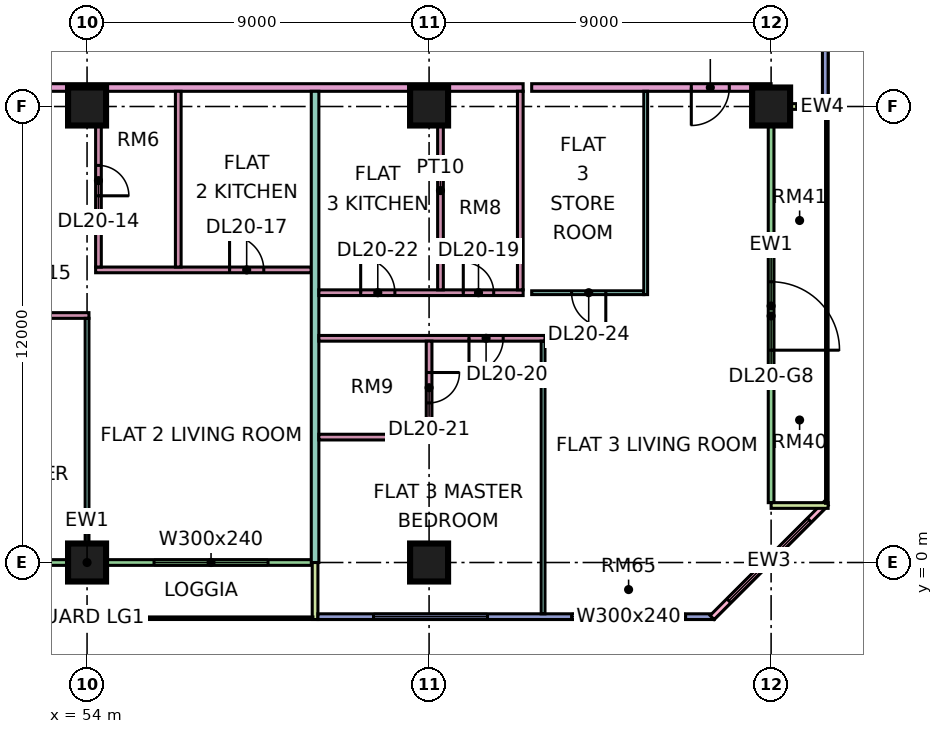
"""IFC4 building model, lengths in metres.
Left out: names, types, materials, properties, quantities, classifications, styles, units other than length and angle.
Written with IfcOpenShell. Run it as: python <this file> out.ifc"""

import sys

from ifc_helpers import new_model, si_unit, direction, frame, frame_2d, origin, origin_2d, place, context, subcontext, project, spatial, rectangle, extrude, element, fill, save


model = new_model("IFC4")
c1 = context("Model", 3, precision=1e-05, world=origin(), true_north=direction((0.0, 1.0)))
c2 = subcontext(c1, "Body", "Model", "MODEL_VIEW")
j1 = project(units=[si_unit("LENGTHUNIT", "METRE"), si_unit("PLANEANGLEUNIT", "RADIAN")], contexts=[c1])
p1 = place(None, origin())
s1 = spatial("IfcSite", under=j1, at=p1, CompositionType="ELEMENT")
p2 = place(p1, origin())
s2 = spatial("IfcBuilding", under=s1, at=p2, CompositionType="ELEMENT")
p3 = place(p2, frame((0.0, 0.0, 91.9)))
s3 = spatial("IfcBuildingStorey", under=s2, at=p3, CompositionType="ELEMENT", Elevation=91.9)
for number, where, z_axis, x_axis in (
    (1, (54.0, 0.0, 0.0), (0.0, 0.0, 1.0), (1.0, 0.0, 0.0)),
    (2, (54.0, 12.0, 0.0), (0.0, 0.0, 1.0), (1.0, 0.0, 0.0)),
    (3, (63.0, 0.0, 0.0), (0.0, 0.0, 1.0), (1.0, 0.0, 0.0)),
    (4, (63.0, 12.0, 0.0), (0.0, 0.0, 1.0), (1.0, 0.0, 0.0)),
    (5, (72.0, 12.0, 0.0), (0.0, 0.0, 1.0), (1.0, 0.0, 0.0)),
):
    element("IfcColumn", number, at=place(p3, frame(where, z_axis=z_axis, x_axis=x_axis)), inside=s3, PredefinedType="COLUMN", context=c2, shape_type="SweptSolid", body=[
        extrude(rectangle(XDim=1.0, YDim=1.0, at=origin_2d()), origin(), (0.0, 0.0, 1.0), 3.75),
    ])
p4 = place(p3, frame((48.075, 0.0, 0.0), z_axis=(0.0, 0.0, 1.0), x_axis=(1.0, 0.0, 0.0)))
e6 = element("IfcWall", 6, at=p4, inside=s3, PredefinedType="SOLIDWALL", context=c2, shape_type="SweptSolid", body=[
    extrude(rectangle(XDim=11.85, YDim=0.15, at=frame_2d((5.925, 0.0))), origin(), (0.0, 0.0, 1.0), 3.35),
])
p5 = place(p4, frame((1.762, 0.0, 0.0)))
e7 = element("IfcOpeningElement", 7, at=p5, cuts=e6, PredefinedType="OPENING", context=c2, shape_type="SweptSolid", body=[
    extrude(rectangle(XDim=1.8, YDim=2.4, at=frame_2d((0.9, 1.2))), frame((0.0, 0.085, 0.0), z_axis=(0.0, -1.0, 0.0), x_axis=(1.0, 0.0, 0.0)), (0.0, 0.0, 1.0), 0.17),
])
p6 = place(p4, frame((7.688, 0.0, 0.45)))
e8 = element("IfcOpeningElement", 8, at=p6, cuts=e6, PredefinedType="OPENING", context=c2, shape_type="SweptSolid", body=[
    extrude(rectangle(XDim=3.0, YDim=2.4, at=frame_2d((1.5, 1.2))), frame((0.0, 0.085, 0.0), z_axis=(0.0, -1.0, 0.0), x_axis=(1.0, 0.0, 0.0)), (0.0, 0.0, 1.0), 0.17),
])
p7 = place(p3, frame((60.0, -1.5, 0.0), z_axis=(0.0, 0.0, 1.0), x_axis=(0.0, 1.0, 0.0)))
e9 = element("IfcWall", 9, at=p7, inside=s3, PredefinedType="SOLIDWALL", context=c2, shape_type="SweptSolid", body=[
    extrude(rectangle(XDim=1.5, YDim=0.15, at=frame_2d((0.75, 0.0))), origin(), (0.0, 0.0, 1.0), 3.35),
])
p8 = place(p3, frame((60.075, -1.425, 0.0), z_axis=(0.0, 0.0, 1.0), x_axis=(1.0, 0.0, 0.0)))
e10 = element("IfcWall", 10, at=p8, inside=s3, PredefinedType="SOLIDWALL", context=c2, shape_type="SweptSolid", body=[
    extrude(rectangle(XDim=10.425, YDim=0.15, at=frame_2d((5.212, 0.0))), origin(), (0.0, 0.0, 1.0), 3.35),
])
p9 = place(p8, frame((1.462, 0.0, 0.45)))
e11 = element("IfcOpeningElement", 11, at=p9, cuts=e10, PredefinedType="OPENING", context=c2, shape_type="SweptSolid", body=[
    extrude(rectangle(XDim=3.0, YDim=2.4, at=frame_2d((1.5, 1.2))), frame((0.0, 0.085, 0.0), z_axis=(0.0, -1.0, 0.0), x_axis=(1.0, 0.0, 0.0)), (0.0, 0.0, 1.0), 0.17),
])
p10 = place(p8, frame((6.675, 0.0, 0.45)))
e12 = element("IfcOpeningElement", 12, at=p10, cuts=e10, PredefinedType="OPENING", context=c2, shape_type="SweptSolid", body=[
    extrude(rectangle(XDim=3.0, YDim=2.4, at=frame_2d((1.5, 1.2))), frame((0.0, 0.085, 0.0), z_axis=(0.0, -1.0, 0.0), x_axis=(1.0, 0.0, 0.0)), (0.0, 0.0, 1.0), 0.17),
])
p11 = place(p3, frame((70.447, -1.447, 0.0), z_axis=(0.0, 0.0, 1.0), x_axis=(0.707106781187, 0.707106781187, 0.0)))
e13 = element("IfcWall", 13, at=p11, inside=s3, PredefinedType="SOLIDWALL", context=c2, shape_type="SweptSolid", body=[
    extrude(rectangle(XDim=4.243, YDim=0.15, at=frame_2d((2.121, 0.0))), origin(), (0.0, 0.0, 1.0), 3.35),
])
p12 = place(p11, frame((0.621, 0.0, 0.45)))
e14 = element("IfcOpeningElement", 14, at=p12, cuts=e13, PredefinedType="OPENING", context=c2, shape_type="SweptSolid", body=[
    extrude(rectangle(XDim=3.0, YDim=2.4, at=frame_2d((1.5, 1.2))), frame((0.0, 0.085, 0.0), z_axis=(0.0, -1.0, 0.0), x_axis=(1.0, 0.0, 0.0)), (0.0, 0.0, 1.0), 0.17),
])
p13 = place(p3, frame((72.0, 1.575, 0.0), z_axis=(0.0, 0.0, 1.0), x_axis=(0.0, 1.0, 0.0)))
e15 = element("IfcWall", 15, at=p13, inside=s3, PredefinedType="SOLIDWALL", context=c2, shape_type="SweptSolid", body=[
    extrude(rectangle(XDim=10.35, YDim=0.15, at=frame_2d((5.175, 0.0))), origin(), (0.0, 0.0, 1.0), 3.35),
])
p14 = place(p13, frame((4.012, 0.0, 0.0)))
e16 = element("IfcOpeningElement", 16, at=p14, cuts=e15, PredefinedType="OPENING", context=c2, shape_type="SweptSolid", body=[
    extrude(rectangle(XDim=1.8, YDim=2.4, at=frame_2d((0.9, 1.2))), frame((0.0, 0.085, 0.0), z_axis=(0.0, -1.0, 0.0), x_axis=(1.0, 0.0, 0.0)), (0.0, 0.0, 1.0), 0.17),
])
for number, where, z_axis, x_axis in (
    (17, (73.5, 1.5, 0.0), (0.0, 0.0, 1.0), (-1.0, 0.0, 0.0)),
    (18, (73.5, 12.0, 0.0), (0.0, 0.0, 1.0), (-1.0, 0.0, 0.0)),
):
    element("IfcWall", number, at=place(p3, frame(where, z_axis=z_axis, x_axis=x_axis)), inside=s3, PredefinedType="SOLIDWALL", context=c2, shape_type="SweptSolid", body=[
        extrude(rectangle(XDim=1.5, YDim=0.15, at=frame_2d((0.75, 0.0))), origin(), (0.0, 0.0, 1.0), 3.35),
    ])
p15 = place(p3, frame((73.425, 12.075, 0.0), z_axis=(0.0, 0.0, 1.0), x_axis=(0.0, 1.0, 0.0)))
e19 = element("IfcWall", 19, at=p15, inside=s3, PredefinedType="SOLIDWALL", context=c2, shape_type="SweptSolid", body=[
    extrude(rectangle(XDim=10.425, YDim=0.15, at=frame_2d((5.212, 0.0))), origin(), (0.0, 0.0, 1.0), 3.35),
])
p16 = place(p15, frame((3.975, 0.0, 0.45)))
e20 = element("IfcOpeningElement", 20, at=p16, cuts=e19, PredefinedType="OPENING", context=c2, shape_type="SweptSolid", body=[
    extrude(rectangle(XDim=1.8, YDim=2.4, at=frame_2d((0.9, 1.2))), frame((0.0, 0.085, 0.0), z_axis=(0.0, -1.0, 0.0), x_axis=(1.0, 0.0, 0.0)), (0.0, 0.0, 1.0), 0.17),
])
p17 = place(p15, frame((8.025, 0.0, 0.45)))
e21 = element("IfcOpeningElement", 21, at=p17, cuts=e19, PredefinedType="OPENING", context=c2, shape_type="SweptSolid", body=[
    extrude(rectangle(XDim=1.8, YDim=2.4, at=frame_2d((0.9, 1.2))), frame((0.0, 0.085, 0.0), z_axis=(0.0, -1.0, 0.0), x_axis=(1.0, 0.0, 0.0)), (0.0, 0.0, 1.0), 0.17),
])
p18 = place(p3, frame((40.65, 12.5, 0.0), z_axis=(0.0, 0.0, 1.0), x_axis=(1.0, 0.0, 0.0)))
e22 = element("IfcWall", 22, at=p18, inside=s3, PredefinedType="PARTITIONING", context=c2, shape_type="SweptSolid", body=[
    extrude(rectangle(XDim=24.825, YDim=0.2, at=frame_2d((12.413, 0.0))), origin(), (0.0, 0.0, 1.0), 3.35),
])
p19 = place(p18, frame((8.4, 0.0, 0.0)))
e23 = element("IfcOpeningElement", 23, at=p19, cuts=e22, PredefinedType="OPENING", context=c2, shape_type="SweptSolid", body=[
    extrude(rectangle(XDim=1.0, YDim=2.1, at=frame_2d((0.5, 1.05))), frame((0.0, 0.11, 0.0), z_axis=(0.0, -1.0, 0.0), x_axis=(1.0, 0.0, 0.0)), (0.0, 0.0, 1.0), 0.22),
])
p20 = place(p18, frame((1.05, 0.0, 0.0)))
e24 = element("IfcOpeningElement", 24, at=p20, cuts=e22, PredefinedType="OPENING", context=c2, shape_type="SweptSolid", body=[
    extrude(rectangle(XDim=1.0, YDim=2.1, at=frame_2d((0.5, 1.05))), frame((0.0, 0.11, 0.0), z_axis=(0.0, -1.0, 0.0), x_axis=(1.0, 0.0, 0.0)), (0.0, 0.0, 1.0), 0.22),
])
p21 = place(p3, frame((48.1, 6.5, 0.0), z_axis=(0.0, 0.0, 1.0), x_axis=(1.0, 0.0, 0.0)))
e25 = element("IfcWall", 25, at=p21, inside=s3, PredefinedType="PARTITIONING", context=c2, shape_type="SweptSolid", body=[
    extrude(rectangle(XDim=5.95, YDim=0.15, at=frame_2d((2.975, 0.0))), origin(), (0.0, 0.0, 1.0), 3.35),
])
p22 = place(p21, frame((3.95, 0.0, 0.0)))
e26 = element("IfcOpeningElement", 26, at=p22, cuts=e25, PredefinedType="OPENING", context=c2, shape_type="SweptSolid", body=[
    extrude(rectangle(XDim=0.9, YDim=2.1, at=frame_2d((0.45, 1.05))), frame((0.0, 0.085, 0.0), z_axis=(0.0, -1.0, 0.0), x_axis=(1.0, 0.0, 0.0)), (0.0, 0.0, 1.0), 0.17),
])
p23 = place(p3, frame((54.0, 0.074, 0.0), z_axis=(0.0, 0.0, 1.0), x_axis=(0.0, 1.0, 0.0)))
e27 = element("IfcWall", 27, at=p23, inside=s3, PredefinedType="PARTITIONING", context=c2, shape_type="SweptSolid", body=[
    extrude(rectangle(XDim=6.351, YDim=0.1, at=frame_2d((3.176, 0.0))), origin(), (0.0, 0.0, 1.0), 3.35),
])
p24 = place(p3, frame((54.225, 7.7, 0.0), z_axis=(0.0, 0.0, 1.0), x_axis=(1.0, 0.0, 0.0)))
e28 = element("IfcWall", 28, at=p24, inside=s3, PredefinedType="PARTITIONING", context=c2, shape_type="SweptSolid", body=[
    extrude(rectangle(XDim=5.675, YDim=0.15, at=frame_2d((2.837, 0.0))), origin(), (0.0, 0.0, 1.0), 3.35),
])
p25 = place(p24, frame((3.525, 0.0, 0.0)))
e29 = element("IfcOpeningElement", 29, at=p25, cuts=e28, PredefinedType="OPENING", context=c2, shape_type="SweptSolid", body=[
    extrude(rectangle(XDim=0.9, YDim=2.1, at=frame_2d((0.45, 1.05))), frame((0.0, 0.085, 0.0), z_axis=(0.0, -1.0, 0.0), x_axis=(1.0, 0.0, 0.0)), (0.0, 0.0, 1.0), 0.17),
])
p26 = place(p3, frame((54.3, 7.775, 0.0), z_axis=(0.0, 0.0, 1.0), x_axis=(0.0, 1.0, 0.0)))
e30 = element("IfcWall", 30, at=p26, inside=s3, PredefinedType="PARTITIONING", context=c2, shape_type="SweptSolid", body=[
    extrude(rectangle(XDim=4.625, YDim=0.15, at=frame_2d((2.312, 0.0))), origin(), (0.0, 0.0, 1.0), 3.35),
])
p27 = place(p26, frame((1.875, 0.0, 0.0)))
e31 = element("IfcOpeningElement", 31, at=p27, cuts=e30, PredefinedType="OPENING", context=c2, shape_type="SweptSolid", body=[
    extrude(rectangle(XDim=0.8, YDim=2.1, at=frame_2d((0.4, 1.05))), frame((0.0, 0.085, 0.0), z_axis=(0.0, -1.0, 0.0), x_axis=(1.0, 0.0, 0.0)), (0.0, 0.0, 1.0), 0.17),
])
p28 = place(p3, frame((56.4, 7.775, 0.0), z_axis=(0.0, 0.0, 1.0), x_axis=(0.0, 1.0, 0.0)))
e32 = element("IfcWall", 32, at=p28, inside=s3, PredefinedType="PARTITIONING", context=c2, shape_type="SweptSolid", body=[
    extrude(rectangle(XDim=4.625, YDim=0.15, at=frame_2d((2.312, 0.0))), origin(), (0.0, 0.0, 1.0), 3.35),
])
p29 = place(p3, frame((60.0, 0.0, 0.0), z_axis=(0.0, 0.0, 1.0), x_axis=(0.0, 1.0, 0.0)))
e33 = element("IfcWall", 33, at=p29, inside=s3, PredefinedType="PARTITIONING", context=c2, shape_type="SweptSolid", body=[
    extrude(rectangle(XDim=12.4, YDim=0.2, at=frame_2d((6.2, 0.0))), origin(), (0.0, 0.0, 1.0), 3.35),
])
p30 = place(p3, frame((60.1, 3.3, 0.0), z_axis=(0.0, 0.0, 1.0), x_axis=(1.0, 0.0, 0.0)))
e34 = element("IfcWall", 34, at=p30, inside=s3, PredefinedType="PARTITIONING", context=c2, shape_type="SweptSolid", body=[
    extrude(rectangle(XDim=2.975, YDim=0.15, at=frame_2d((1.487, 0.0))), origin(), (0.0, 0.0, 1.0), 3.35),
])
p31 = place(p3, frame((60.1, 5.9, 0.0), z_axis=(0.0, 0.0, 1.0), x_axis=(1.0, 0.0, 0.0)))
e35 = element("IfcWall", 35, at=p31, inside=s3, PredefinedType="PARTITIONING", context=c2, shape_type="SweptSolid", body=[
    extrude(rectangle(XDim=5.95, YDim=0.15, at=frame_2d((2.975, 0.0))), origin(), (0.0, 0.0, 1.0), 3.35),
])
p32 = place(p31, frame((3.95, 0.0, 0.0)))
e36 = element("IfcOpeningElement", 36, at=p32, cuts=e35, PredefinedType="OPENING", context=c2, shape_type="SweptSolid", body=[
    extrude(rectangle(XDim=0.9, YDim=2.1, at=frame_2d((0.45, 1.05))), frame((0.0, 0.085, 0.0), z_axis=(0.0, -1.0, 0.0), x_axis=(1.0, 0.0, 0.0)), (0.0, 0.0, 1.0), 0.17),
])
p33 = place(p3, frame((60.1, 7.1, 0.0), z_axis=(0.0, 0.0, 1.0), x_axis=(1.0, 0.0, 0.0)))
e37 = element("IfcWall", 37, at=p33, inside=s3, PredefinedType="PARTITIONING", context=c2, shape_type="SweptSolid", body=[
    extrude(rectangle(XDim=5.375, YDim=0.15, at=frame_2d((2.688, 0.0))), origin(), (0.0, 0.0, 1.0), 3.35),
])
p34 = place(p33, frame((3.8, 0.0, 0.0)))
e38 = element("IfcOpeningElement", 38, at=p34, cuts=e37, PredefinedType="OPENING", context=c2, shape_type="SweptSolid", body=[
    extrude(rectangle(XDim=0.8, YDim=2.1, at=frame_2d((0.4, 1.05))), frame((0.0, 0.085, 0.0), z_axis=(0.0, -1.0, 0.0), x_axis=(1.0, 0.0, 0.0)), (0.0, 0.0, 1.0), 0.17),
])
p35 = place(p33, frame((1.1, 0.0, 0.0)))
e39 = element("IfcOpeningElement", 39, at=p35, cuts=e37, PredefinedType="OPENING", context=c2, shape_type="SweptSolid", body=[
    extrude(rectangle(XDim=0.9, YDim=2.1, at=frame_2d((0.45, 1.05))), frame((0.0, 0.085, 0.0), z_axis=(0.0, -1.0, 0.0), x_axis=(1.0, 0.0, 0.0)), (0.0, 0.0, 1.0), 0.17),
])
p36 = place(p3, frame((63.0, 3.375, 0.0), z_axis=(0.0, 0.0, 1.0), x_axis=(0.0, 1.0, 0.0)))
e40 = element("IfcWall", 40, at=p36, inside=s3, PredefinedType="PARTITIONING", context=c2, shape_type="SweptSolid", body=[
    extrude(rectangle(XDim=2.45, YDim=0.15, at=frame_2d((1.225, 0.0))), origin(), (0.0, 0.0, 1.0), 3.35),
])
p37 = place(p36, frame((0.825, 0.0, 0.0)))
e41 = element("IfcOpeningElement", 41, at=p37, cuts=e40, PredefinedType="OPENING", context=c2, shape_type="SweptSolid", body=[
    extrude(rectangle(XDim=0.8, YDim=2.1, at=frame_2d((0.4, 1.05))), frame((0.0, 0.085, 0.0), z_axis=(0.0, -1.0, 0.0), x_axis=(1.0, 0.0, 0.0)), (0.0, 0.0, 1.0), 0.17),
])
for number, where, z_axis, x_axis in (
    (42, (63.3, 7.175, 0.0), (0.0, 0.0, 1.0), (0.0, 1.0, 0.0)),
    (43, (65.4, 7.175, 0.0), (0.0, 0.0, 1.0), (0.0, 1.0, 0.0)),
):
    element("IfcWall", number, at=place(p3, frame(where, z_axis=z_axis, x_axis=x_axis)), inside=s3, PredefinedType="PARTITIONING", context=c2, shape_type="SweptSolid", body=[
        extrude(rectangle(XDim=5.225, YDim=0.15, at=frame_2d((2.612, 0.0))), origin(), (0.0, 0.0, 1.0), 3.35),
    ])
p38 = place(p3, frame((65.7, 7.1, 0.0), z_axis=(0.0, 0.0, 1.0), x_axis=(1.0, 0.0, 0.0)))
e44 = element("IfcWall", 44, at=p38, inside=s3, PredefinedType="PARTITIONING", context=c2, shape_type="SweptSolid", body=[
    extrude(rectangle(XDim=2.95, YDim=0.1, at=frame_2d((1.475, 0.0))), origin(), (0.0, 0.0, 1.0), 3.35),
])
p39 = place(p38, frame((1.05, 0.0, 0.0)))
e45 = element("IfcOpeningElement", 45, at=p39, cuts=e44, PredefinedType="OPENING", context=c2, shape_type="SweptSolid", body=[
    extrude(rectangle(XDim=0.9, YDim=2.1, at=frame_2d((0.45, 1.05))), frame((0.0, 0.06, 0.0), z_axis=(0.0, -1.0, 0.0), x_axis=(1.0, 0.0, 0.0)), (0.0, 0.0, 1.0), 0.12),
])
p40 = place(p3, frame((65.7, 12.5, 0.0), z_axis=(0.0, 0.0, 1.0), x_axis=(1.0, 0.0, 0.0)))
e46 = element("IfcWall", 46, at=p40, inside=s3, PredefinedType="PARTITIONING", context=c2, shape_type="SweptSolid", body=[
    extrude(rectangle(XDim=6.3, YDim=0.2, at=frame_2d((3.15, 0.0))), origin(), (0.0, 0.0, 1.0), 3.35),
])
p41 = place(p40, frame((4.2, 0.0, 0.0)))
e47 = element("IfcOpeningElement", 47, at=p41, cuts=e46, PredefinedType="OPENING", context=c2, shape_type="SweptSolid", body=[
    extrude(rectangle(XDim=1.0, YDim=2.1, at=frame_2d((0.5, 1.05))), frame((0.0, 0.11, 0.0), z_axis=(0.0, -1.0, 0.0), x_axis=(1.0, 0.0, 0.0)), (0.0, 0.0, 1.0), 0.22),
])
p42 = place(p3, frame((66.0, -1.35, 0.0), z_axis=(0.0, 0.0, 1.0), x_axis=(0.0, 1.0, 0.0)))
e48 = element("IfcWall", 48, at=p42, inside=s3, PredefinedType="PARTITIONING", context=c2, shape_type="SweptSolid", body=[
    extrude(rectangle(XDim=7.175, YDim=0.1, at=frame_2d((3.587, 0.0))), origin(), (0.0, 0.0, 1.0), 3.35),
])
p43 = place(p3, frame((68.7, 7.05, 0.0), z_axis=(0.0, 0.0, 1.0), x_axis=(0.0, 1.0, 0.0)))
e49 = element("IfcWall", 49, at=p43, inside=s3, PredefinedType="PARTITIONING", context=c2, shape_type="SweptSolid", body=[
    extrude(rectangle(XDim=5.35, YDim=0.1, at=frame_2d((2.675, 0.0))), origin(), (0.0, 0.0, 1.0), 3.35),
])
p44 = place(p6, origin())
e50 = element("IfcWindow", 50, at=p44, inside=s3, PartitioningType="SINGLE_PANEL", PredefinedType="WINDOW", context=c2, shape_type="SweptSolid", body=[
    extrude(rectangle(XDim=3.0, YDim=2.4, at=frame_2d((1.5, 1.2))), frame((0.0, 0.03, 0.0), z_axis=(0.0, -1.0, 0.0), x_axis=(1.0, 0.0, 0.0)), (0.0, 0.0, 1.0), 0.06),
])
fill(e8, e50)
p45 = place(p9, origin())
e51 = element("IfcWindow", 51, at=p45, inside=s3, PartitioningType="SINGLE_PANEL", PredefinedType="WINDOW", context=c2, shape_type="SweptSolid", body=[
    extrude(rectangle(XDim=3.0, YDim=2.4, at=frame_2d((1.5, 1.2))), frame((0.0, 0.03, 0.0), z_axis=(0.0, -1.0, 0.0), x_axis=(1.0, 0.0, 0.0)), (0.0, 0.0, 1.0), 0.06),
])
fill(e11, e51)
p46 = place(p10, origin())
e52 = element("IfcWindow", 52, at=p46, inside=s3, PartitioningType="SINGLE_PANEL", PredefinedType="WINDOW", context=c2, shape_type="SweptSolid", body=[
    extrude(rectangle(XDim=3.0, YDim=2.4, at=frame_2d((1.5, 1.2))), frame((0.0, 0.03, 0.0), z_axis=(0.0, -1.0, 0.0), x_axis=(1.0, 0.0, 0.0)), (0.0, 0.0, 1.0), 0.06),
])
fill(e12, e52)
p47 = place(p12, origin())
e53 = element("IfcWindow", 53, at=p47, inside=s3, PartitioningType="SINGLE_PANEL", PredefinedType="WINDOW", context=c2, shape_type="SweptSolid", body=[
    extrude(rectangle(XDim=3.0, YDim=2.4, at=frame_2d((1.5, 1.2))), frame((0.0, 0.03, 0.0), z_axis=(0.0, -1.0, 0.0), x_axis=(1.0, 0.0, 0.0)), (0.0, 0.0, 1.0), 0.06),
])
fill(e14, e53)
p48 = place(p14, frame((1.8, 0.0, 0.0), z_axis=(0.0, 0.0, 1.0), x_axis=(-1.0, 0.0, 0.0)))
e54 = element("IfcDoor", 54, at=p48, inside=s3, OperationType="DOUBLE_DOOR_SINGLE_SWING", PredefinedType="DOOR", context=c2, shape_type="SweptSolid", body=[
    extrude(rectangle(XDim=1.8, YDim=2.4, at=frame_2d((0.9, 1.2))), frame((0.0, 0.025, 0.0), z_axis=(0.0, -1.0, 0.0), x_axis=(1.0, 0.0, 0.0)), (0.0, 0.0, 1.0), 0.05),
])
fill(e16, e54)
p49 = place(p27, frame((0.8, 0.0, 0.0), z_axis=(0.0, 0.0, 1.0), x_axis=(-1.0, 0.0, 0.0)))
e55 = element("IfcDoor", 55, at=p49, inside=s3, OperationType="SINGLE_SWING_LEFT", PredefinedType="DOOR", context=c2, shape_type="SweptSolid", body=[
    extrude(rectangle(XDim=0.8, YDim=2.1, at=frame_2d((0.4, 1.05))), frame((0.0, 0.025, 0.0), z_axis=(0.0, -1.0, 0.0), x_axis=(1.0, 0.0, 0.0)), (0.0, 0.0, 1.0), 0.05),
])
fill(e31, e55)
p50 = place(p25, origin())
e56 = element("IfcDoor", 56, at=p50, inside=s3, OperationType="SINGLE_SWING_LEFT", PredefinedType="DOOR", context=c2, shape_type="SweptSolid", body=[
    extrude(rectangle(XDim=0.9, YDim=2.1, at=frame_2d((0.45, 1.05))), frame((0.0, 0.025, 0.0), z_axis=(0.0, -1.0, 0.0), x_axis=(1.0, 0.0, 0.0)), (0.0, 0.0, 1.0), 0.05),
])
fill(e29, e56)
p51 = place(p34, origin())
e57 = element("IfcDoor", 57, at=p51, inside=s3, OperationType="SINGLE_SWING_LEFT", PredefinedType="DOOR", context=c2, shape_type="SweptSolid", body=[
    extrude(rectangle(XDim=0.8, YDim=2.1, at=frame_2d((0.4, 1.05))), frame((0.0, 0.025, 0.0), z_axis=(0.0, -1.0, 0.0), x_axis=(1.0, 0.0, 0.0)), (0.0, 0.0, 1.0), 0.05),
])
fill(e38, e57)
p52 = place(p32, frame((0.9, 0.0, 0.0), z_axis=(0.0, 0.0, 1.0), x_axis=(-1.0, 0.0, 0.0)))
e58 = element("IfcDoor", 58, at=p52, inside=s3, OperationType="SINGLE_SWING_LEFT", PredefinedType="DOOR", context=c2, shape_type="SweptSolid", body=[
    extrude(rectangle(XDim=0.9, YDim=2.1, at=frame_2d((0.45, 1.05))), frame((0.0, 0.025, 0.0), z_axis=(0.0, -1.0, 0.0), x_axis=(1.0, 0.0, 0.0)), (0.0, 0.0, 1.0), 0.05),
])
fill(e36, e58)
p53 = place(p37, origin())
e59 = element("IfcDoor", 59, at=p53, inside=s3, OperationType="SINGLE_SWING_RIGHT", PredefinedType="DOOR", context=c2, shape_type="SweptSolid", body=[
    extrude(rectangle(XDim=0.8, YDim=2.1, at=frame_2d((0.4, 1.05))), frame((0.0, 0.025, 0.0), z_axis=(0.0, -1.0, 0.0), x_axis=(1.0, 0.0, 0.0)), (0.0, 0.0, 1.0), 0.05),
])
fill(e41, e59)
p54 = place(p35, origin())
e60 = element("IfcDoor", 60, at=p54, inside=s3, OperationType="SINGLE_SWING_LEFT", PredefinedType="DOOR", context=c2, shape_type="SweptSolid", body=[
    extrude(rectangle(XDim=0.9, YDim=2.1, at=frame_2d((0.45, 1.05))), frame((0.0, 0.025, 0.0), z_axis=(0.0, -1.0, 0.0), x_axis=(1.0, 0.0, 0.0)), (0.0, 0.0, 1.0), 0.05),
])
fill(e39, e60)
p55 = place(p41, frame((1.0, 0.0, 0.0), z_axis=(0.0, 0.0, 1.0), x_axis=(-1.0, 0.0, 0.0)))
e61 = element("IfcDoor", 61, at=p55, inside=s3, OperationType="SINGLE_SWING_LEFT", PredefinedType="DOOR", context=c2, shape_type="SweptSolid", body=[
    extrude(rectangle(XDim=1.0, YDim=2.1, at=frame_2d((0.5, 1.05))), frame((0.0, 0.025, 0.0), z_axis=(0.0, -1.0, 0.0), x_axis=(1.0, 0.0, 0.0)), (0.0, 0.0, 1.0), 0.05),
])
fill(e47, e61)
p56 = place(p39, origin())
e62 = element("IfcDoor", 62, at=p56, inside=s3, OperationType="SINGLE_SWING_RIGHT", PredefinedType="DOOR", context=c2, shape_type="SweptSolid", body=[
    extrude(rectangle(XDim=0.9, YDim=2.1, at=frame_2d((0.45, 1.05))), frame((0.0, 0.025, 0.0), z_axis=(0.0, -1.0, 0.0), x_axis=(1.0, 0.0, 0.0)), (0.0, 0.0, 1.0), 0.05),
])
fill(e45, e62)
save(model, sys.argv[1])
